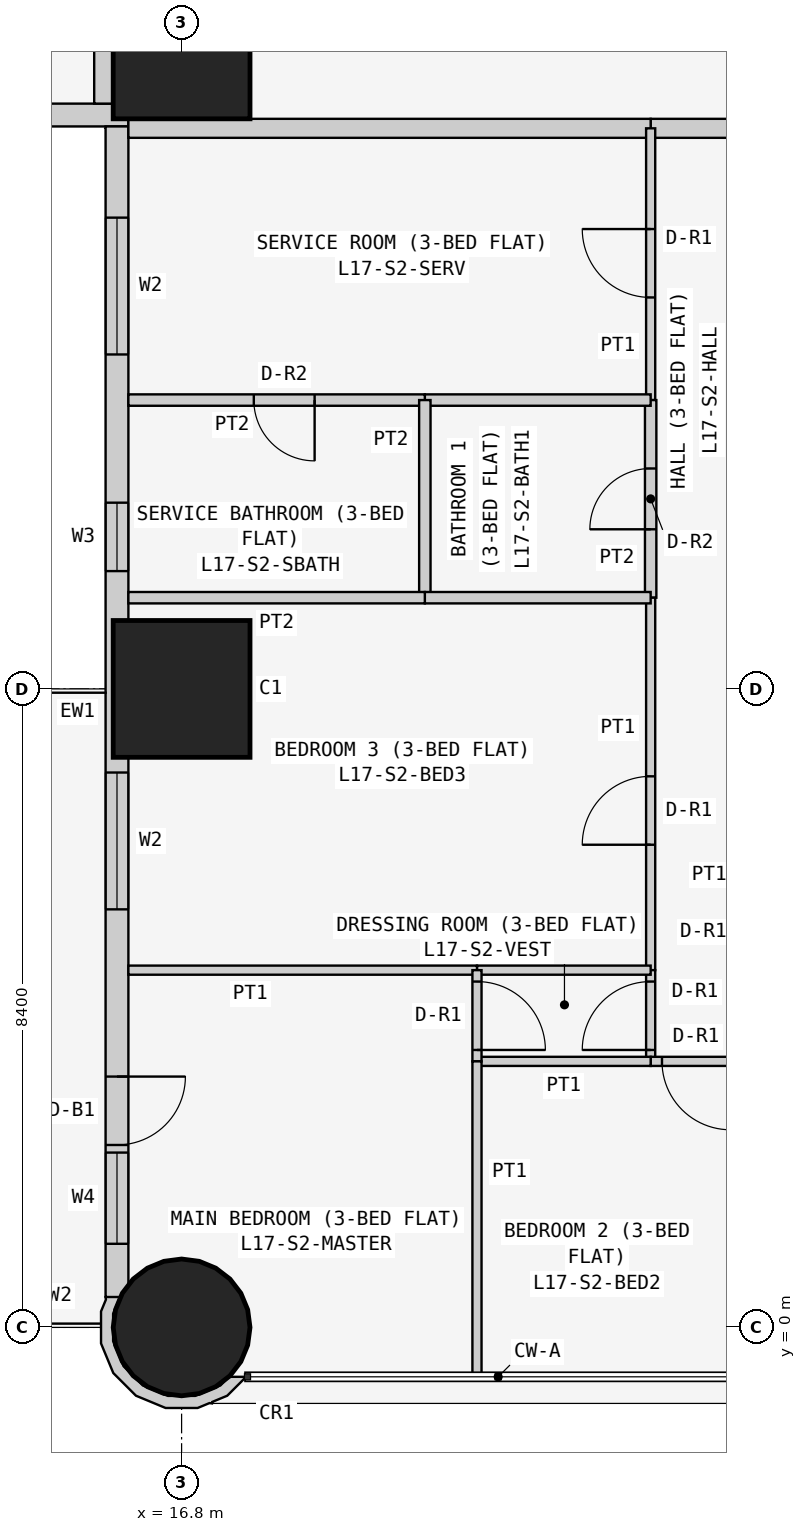
"""IFC4 building model, lengths in metres.
Left out: names, types, materials, properties, quantities, classifications, styles, units other than length and angle.
Written with IfcOpenShell. Run it as: python <this file> out.ifc"""

import sys

from ifc_helpers import new_model, si_unit, direction, frame, frame_2d, origin, origin_2d, place, context, subcontext, project, spatial, polyline, rectangle, circle, outline, extrude, element, fill, save


model = new_model("IFC4")
c1 = context("Model", 3, precision=1e-05, world=origin(), true_north=direction((0.0, 1.0)))
c2 = subcontext(c1, "Body", "Model", "MODEL_VIEW")
j1 = project(units=[si_unit("LENGTHUNIT", "METRE"), si_unit("PLANEANGLEUNIT", "RADIAN")], contexts=[c1])
p1 = place(None, origin())
s1 = spatial("IfcSite", under=j1, at=p1, CompositionType="ELEMENT")
p2 = place(p1, origin())
s2 = spatial("IfcBuilding", under=s1, at=p2, CompositionType="ELEMENT")
p3 = place(p2, frame((0.0, 0.0, 70.5)))
s3 = spatial("IfcBuildingStorey", under=s2, at=p3, CompositionType="ELEMENT", Elevation=70.5)
p4 = place(p3, frame((16.8, 0.0, 0.0), z_axis=(0.0, 0.0, 1.0), x_axis=(1.0, 0.0, 0.0)))
e1 = element("IfcColumn", 1, at=p4, inside=s3, PredefinedType="COLUMN", context=c2, shape_type="SweptSolid", body=[
    extrude(circle(Radius=0.9, at=origin_2d()), origin(), (0.0, 0.0, 1.0), 3.6),
])
for number, where, z_axis, x_axis in (
    (2, (16.8, 8.4, 0.0), (0.0, 0.0, 1.0), (1.0, 0.0, 0.0)),
    (3, (16.8, 16.8, 0.0), (0.0, 0.0, 1.0), (1.0, 0.0, 0.0)),
):
    element("IfcColumn", number, at=place(p3, frame(where, z_axis=z_axis, x_axis=x_axis)), inside=s3, PredefinedType="COLUMN", context=c2, shape_type="SweptSolid", body=[
        extrude(rectangle(XDim=1.8, YDim=1.8, at=origin_2d()), origin(), (0.0, 0.0, 1.0), 3.6),
    ])
p5 = place(p3, frame((0.4, 15.95, 0.0), z_axis=(0.0, 0.0, 1.0), x_axis=(1.0, 0.0, 0.0)))
e4 = element("IfcWall", 4, at=p5, inside=s3, PredefinedType="SOLIDWALL", context=c2, shape_type="SweptSolid", body=[
    extrude(rectangle(XDim=15.7, YDim=0.3, at=frame_2d((7.85, 0.0))), origin(), (0.0, 0.0, 1.0), 3.45),
])
p6 = place(p5, frame((12.4, 0.0, 0.9)))
e5 = element("IfcOpeningElement", 5, at=p6, cuts=e4, PredefinedType="OPENING", context=c2, shape_type="SweptSolid", body=[
    extrude(rectangle(XDim=1.8, YDim=1.5, at=frame_2d((0.9, 0.75))), frame((0.0, 0.16, 0.0), z_axis=(0.0, -1.0, 0.0), x_axis=(1.0, 0.0, 0.0)), (0.0, 0.0, 1.0), 0.32),
])
p7 = place(p5, frame((9.55, 0.0, 1.5)))
e6 = element("IfcOpeningElement", 6, at=p7, cuts=e4, PredefinedType="OPENING", context=c2, shape_type="SweptSolid", body=[
    extrude(rectangle(XDim=0.9, YDim=0.7, at=frame_2d((0.45, 0.35))), frame((0.0, 0.16, 0.0), z_axis=(0.0, -1.0, 0.0), x_axis=(1.0, 0.0, 0.0)), (0.0, 0.0, 1.0), 0.32),
])
p8 = place(p5, frame((5.1, 0.0, 0.9)))
e7 = element("IfcOpeningElement", 7, at=p8, cuts=e4, PredefinedType="OPENING", context=c2, shape_type="SweptSolid", body=[
    extrude(rectangle(XDim=1.8, YDim=1.5, at=frame_2d((0.9, 0.75))), frame((0.0, 0.16, 0.0), z_axis=(0.0, -1.0, 0.0), x_axis=(1.0, 0.0, 0.0)), (0.0, 0.0, 1.0), 0.32),
])
p9 = place(p5, frame((2.0, 0.0, 0.0)))
e8 = element("IfcOpeningElement", 8, at=p9, cuts=e4, PredefinedType="OPENING", context=c2, shape_type="SweptSolid", body=[
    extrude(rectangle(XDim=0.9, YDim=2.4, at=frame_2d((0.45, 1.2))), frame((0.0, 0.16, 0.0), z_axis=(0.0, -1.0, 0.0), x_axis=(1.0, 0.0, 0.0)), (0.0, 0.0, 1.0), 0.32),
])
p10 = place(p5, frame((0.7, 0.0, 0.9)))
e9 = element("IfcOpeningElement", 9, at=p10, cuts=e4, PredefinedType="OPENING", context=c2, shape_type="SweptSolid", body=[
    extrude(rectangle(XDim=1.2, YDim=1.5, at=frame_2d((0.6, 0.75))), frame((0.0, 0.16, 0.0), z_axis=(0.0, -1.0, 0.0), x_axis=(1.0, 0.0, 0.0)), (0.0, 0.0, 1.0), 0.32),
])
p11 = place(p3, frame((15.95, 15.8, 0.0), z_axis=(0.0, 0.0, 1.0), x_axis=(0.0, -1.0, 0.0)))
e10 = element("IfcWall", 10, at=p11, inside=s3, PredefinedType="SOLIDWALL", context=c2, shape_type="SweptSolid", body=[
    extrude(rectangle(XDim=15.4, YDim=0.3, at=frame_2d((7.7, 0.0))), origin(), (0.0, 0.0, 1.0), 3.45),
])
p12 = place(p11, frame((1.2, 0.0, 0.9)))
e11 = element("IfcOpeningElement", 11, at=p12, cuts=e10, PredefinedType="OPENING", context=c2, shape_type="SweptSolid", body=[
    extrude(rectangle(XDim=1.8, YDim=1.5, at=frame_2d((0.9, 0.75))), frame((0.0, 0.16, 0.0), z_axis=(0.0, -1.0, 0.0), x_axis=(1.0, 0.0, 0.0)), (0.0, 0.0, 1.0), 0.32),
])
p13 = place(p11, frame((4.95, 0.0, 1.5)))
e12 = element("IfcOpeningElement", 12, at=p13, cuts=e10, PredefinedType="OPENING", context=c2, shape_type="SweptSolid", body=[
    extrude(rectangle(XDim=0.9, YDim=0.7, at=frame_2d((0.45, 0.35))), frame((0.0, 0.16, 0.0), z_axis=(0.0, -1.0, 0.0), x_axis=(1.0, 0.0, 0.0)), (0.0, 0.0, 1.0), 0.32),
])
p14 = place(p11, frame((8.5, 0.0, 0.9)))
e13 = element("IfcOpeningElement", 13, at=p14, cuts=e10, PredefinedType="OPENING", context=c2, shape_type="SweptSolid", body=[
    extrude(rectangle(XDim=1.8, YDim=1.5, at=frame_2d((0.9, 0.75))), frame((0.0, 0.16, 0.0), z_axis=(0.0, -1.0, 0.0), x_axis=(1.0, 0.0, 0.0)), (0.0, 0.0, 1.0), 0.32),
])
p15 = place(p11, frame((12.5, 0.0, 0.0)))
e14 = element("IfcOpeningElement", 14, at=p15, cuts=e10, PredefinedType="OPENING", context=c2, shape_type="SweptSolid", body=[
    extrude(rectangle(XDim=0.9, YDim=2.4, at=frame_2d((0.45, 1.2))), frame((0.0, 0.16, 0.0), z_axis=(0.0, -1.0, 0.0), x_axis=(1.0, 0.0, 0.0)), (0.0, 0.0, 1.0), 0.32),
])
p16 = place(p11, frame((13.5, 0.0, 0.9)))
e15 = element("IfcOpeningElement", 15, at=p16, cuts=e10, PredefinedType="OPENING", context=c2, shape_type="SweptSolid", body=[
    extrude(rectangle(XDim=1.2, YDim=1.5, at=frame_2d((0.6, 0.75))), frame((0.0, 0.16, 0.0), z_axis=(0.0, -1.0, 0.0), x_axis=(1.0, 0.0, 0.0)), (0.0, 0.0, 1.0), 0.32),
])
p17 = place(p3, frame((15.89, 0.364, 0.0), z_axis=(0.0, 0.0, 1.0), x_axis=(-0.377204953059, -0.926129809145, 0.0)))
e16 = element("IfcWall", 16, at=p17, inside=s3, PredefinedType="SOLIDWALL", context=c2, shape_type="SweptSolid", body=[
    extrude(outline(polyline([(0.36, 1.803), (0.509, 1.741), (0.761, 1.486), (0.896, 1.154), (0.894, 0.795), (0.755, 0.465), (0.5, 0.213), (0.168, 0.078), (-0.1, 0.08), (0.001, -0.097), (0.03, -0.08), (0.199, -0.081), (0.589, 0.078), (0.889, 0.374), (1.053, 0.763), (1.055, 1.185), (0.896, 1.575), (0.778, 1.695), (0.769, 1.728), (0.75, 1.723), (0.6, 1.875), (0.295, 2.004), (0.281, 1.998), (0.36, 1.803)])), origin(), (0.0, 0.0, 1.0), 3.45),
])
p18 = place(p3, frame((24.171, 15.775, 0.0), z_axis=(0.0, 0.0, 1.0), x_axis=(-1.0, 0.0, 0.0)))
e17 = element("IfcWall", 17, at=p18, inside=s3, PredefinedType="PARTITIONING", context=c2, shape_type="SweptSolid", body=[
    extrude(rectangle(XDim=1.2, YDim=0.25, at=frame_2d((0.6, 0.0))), origin(), (0.0, 0.0, 1.0), 3.45),
])
p19 = place(p3, frame((22.971, 15.775, 0.0), z_axis=(0.0, 0.0, 1.0), x_axis=(-1.0, 0.0, 0.0)))
e18 = element("IfcWall", 18, at=p19, inside=s3, PredefinedType="PARTITIONING", context=c2, shape_type="SweptSolid", body=[
    extrude(rectangle(XDim=6.871, YDim=0.25, at=frame_2d((3.436, 0.0))), origin(), (0.0, 0.0, 1.0), 3.45),
])
p20 = place(p3, frame((15.775, 16.1, 0.0), z_axis=(0.0, 0.0, 1.0), x_axis=(0.0, 1.0, 0.0)))
e19 = element("IfcWall", 19, at=p20, inside=s3, PredefinedType="PARTITIONING", context=c2, shape_type="SweptSolid", body=[
    extrude(rectangle(XDim=6.471, YDim=0.25, at=frame_2d((3.235, 0.0))), origin(), (0.0, 0.0, 1.0), 3.45),
])
p21 = place(p3, frame((22.971, 12.2, 0.0), z_axis=(0.0, 0.0, 1.0), x_axis=(0.0, 1.0, 0.0)))
e20 = element("IfcWall", 20, at=p21, inside=s3, PredefinedType="PARTITIONING", context=c2, shape_type="SweptSolid", body=[
    extrude(rectangle(XDim=3.575, YDim=0.12, at=frame_2d((1.788, 0.0))), origin(), (0.0, 0.0, 1.0), 3.45),
])
p22 = place(p21, frame((1.35, 0.0, 0.0)))
e21 = element("IfcOpeningElement", 21, at=p22, cuts=e20, PredefinedType="OPENING", context=c2, shape_type="SweptSolid", body=[
    extrude(rectangle(XDim=0.9, YDim=2.1, at=frame_2d((0.45, 1.05))), frame((0.0, 0.07, 0.0), z_axis=(0.0, -1.0, 0.0), x_axis=(1.0, 0.0, 0.0)), (0.0, 0.0, 1.0), 0.14),
])
p23 = place(p3, frame((22.971, 9.6, 0.0), z_axis=(0.0, 0.0, 1.0), x_axis=(0.0, 1.0, 0.0)))
e22 = element("IfcWall", 22, at=p23, inside=s3, PredefinedType="PARTITIONING", context=c2, shape_type="SweptSolid", body=[
    extrude(rectangle(XDim=2.6, YDim=0.15, at=frame_2d((1.3, 0.0))), origin(), (0.0, 0.0, 1.0), 3.45),
])
p24 = place(p23, frame((0.9, 0.0, 0.0)))
e23 = element("IfcOpeningElement", 23, at=p24, cuts=e22, PredefinedType="OPENING", context=c2, shape_type="SweptSolid", body=[
    extrude(rectangle(XDim=0.8, YDim=2.1, at=frame_2d((0.4, 1.05))), frame((0.0, 0.085, 0.0), z_axis=(0.0, -1.0, 0.0), x_axis=(1.0, 0.0, 0.0)), (0.0, 0.0, 1.0), 0.17),
])
p25 = place(p3, frame((22.971, 4.7, 0.0), z_axis=(0.0, 0.0, 1.0), x_axis=(0.0, 1.0, 0.0)))
e24 = element("IfcWall", 24, at=p25, inside=s3, PredefinedType="PARTITIONING", context=c2, shape_type="SweptSolid", body=[
    extrude(rectangle(XDim=4.9, YDim=0.12, at=frame_2d((2.45, 0.0))), origin(), (0.0, 0.0, 1.0), 3.45),
])
p26 = place(p25, frame((1.65, 0.0, 0.0)))
e25 = element("IfcOpeningElement", 25, at=p26, cuts=e24, PredefinedType="OPENING", context=c2, shape_type="SweptSolid", body=[
    extrude(rectangle(XDim=0.9, YDim=2.1, at=frame_2d((0.45, 1.05))), frame((0.0, 0.07, 0.0), z_axis=(0.0, -1.0, 0.0), x_axis=(1.0, 0.0, 0.0)), (0.0, 0.0, 1.0), 0.14),
])
p27 = place(p3, frame((22.971, 3.5, 0.0), z_axis=(0.0, 0.0, 1.0), x_axis=(0.0, 1.0, 0.0)))
e26 = element("IfcWall", 26, at=p27, inside=s3, PredefinedType="PARTITIONING", context=c2, shape_type="SweptSolid", body=[
    extrude(rectangle(XDim=1.2, YDim=0.12, at=frame_2d((0.6, 0.0))), origin(), (0.0, 0.0, 1.0), 3.45),
])
p28 = place(p27, frame((0.15, 0.0, 0.0)))
e27 = element("IfcOpeningElement", 27, at=p28, cuts=e26, PredefinedType="OPENING", context=c2, shape_type="SweptSolid", body=[
    extrude(rectangle(XDim=0.9, YDim=2.1, at=frame_2d((0.45, 1.05))), frame((0.0, 0.07, 0.0), z_axis=(0.0, -1.0, 0.0), x_axis=(1.0, 0.0, 0.0)), (0.0, 0.0, 1.0), 0.14),
])
p29 = place(p3, frame((24.171, 3.5, 0.0), z_axis=(0.0, 0.0, 1.0), x_axis=(-1.0, 0.0, 0.0)))
e28 = element("IfcWall", 28, at=p29, inside=s3, PredefinedType="PARTITIONING", context=c2, shape_type="SweptSolid", body=[
    extrude(rectangle(XDim=1.2, YDim=0.12, at=frame_2d((0.6, 0.0))), origin(), (0.0, 0.0, 1.0), 3.45),
])
p30 = place(p29, frame((0.151, 0.0, 0.0)))
e29 = element("IfcOpeningElement", 29, at=p30, cuts=e28, PredefinedType="OPENING", context=c2, shape_type="SweptSolid", body=[
    extrude(rectangle(XDim=0.9, YDim=2.1, at=frame_2d((0.45, 1.05))), frame((0.0, 0.07, 0.0), z_axis=(0.0, -1.0, 0.0), x_axis=(1.0, 0.0, 0.0)), (0.0, 0.0, 1.0), 0.14),
])
p31 = place(p3, frame((22.971, 12.2, 0.0), z_axis=(0.0, 0.0, 1.0), x_axis=(-1.0, 0.0, 0.0)))
e30 = element("IfcWall", 30, at=p31, inside=s3, PredefinedType="PARTITIONING", context=c2, shape_type="SweptSolid", body=[
    extrude(rectangle(XDim=2.971, YDim=0.15, at=frame_2d((1.485, 0.0))), origin(), (0.0, 0.0, 1.0), 3.45),
])
p32 = place(p3, frame((20.0, 12.2, 0.0), z_axis=(0.0, 0.0, 1.0), x_axis=(-1.0, 0.0, 0.0)))
e31 = element("IfcWall", 31, at=p32, inside=s3, PredefinedType="PARTITIONING", context=c2, shape_type="SweptSolid", body=[
    extrude(rectangle(XDim=3.9, YDim=0.15, at=frame_2d((1.95, 0.0))), origin(), (0.0, 0.0, 1.0), 3.45),
])
p33 = place(p32, frame((1.45, 0.0, 0.0)))
e32 = element("IfcOpeningElement", 32, at=p33, cuts=e31, PredefinedType="OPENING", context=c2, shape_type="SweptSolid", body=[
    extrude(rectangle(XDim=0.8, YDim=2.1, at=frame_2d((0.4, 1.05))), frame((0.0, 0.085, 0.0), z_axis=(0.0, -1.0, 0.0), x_axis=(1.0, 0.0, 0.0)), (0.0, 0.0, 1.0), 0.17),
])
p34 = place(p3, frame((20.0, 9.6, 0.0), z_axis=(0.0, 0.0, 1.0), x_axis=(0.0, 1.0, 0.0)))
e33 = element("IfcWall", 33, at=p34, inside=s3, PredefinedType="PARTITIONING", context=c2, shape_type="SweptSolid", body=[
    extrude(rectangle(XDim=2.6, YDim=0.15, at=frame_2d((1.3, 0.0))), origin(), (0.0, 0.0, 1.0), 3.45),
])
p35 = place(p3, frame((22.971, 9.6, 0.0), z_axis=(0.0, 0.0, 1.0), x_axis=(-1.0, 0.0, 0.0)))
e34 = element("IfcWall", 34, at=p35, inside=s3, PredefinedType="PARTITIONING", context=c2, shape_type="SweptSolid", body=[
    extrude(rectangle(XDim=2.971, YDim=0.15, at=frame_2d((1.485, 0.0))), origin(), (0.0, 0.0, 1.0), 3.45),
])
p36 = place(p3, frame((20.0, 9.6, 0.0), z_axis=(0.0, 0.0, 1.0), x_axis=(-1.0, 0.0, 0.0)))
e35 = element("IfcWall", 35, at=p36, inside=s3, PredefinedType="PARTITIONING", context=c2, shape_type="SweptSolid", body=[
    extrude(rectangle(XDim=3.9, YDim=0.15, at=frame_2d((1.95, 0.0))), origin(), (0.0, 0.0, 1.0), 3.45),
])
p37 = place(p3, frame((22.971, 4.7, 0.0), z_axis=(0.0, 0.0, 1.0), x_axis=(-1.0, 0.0, 0.0)))
e36 = element("IfcWall", 36, at=p37, inside=s3, PredefinedType="PARTITIONING", context=c2, shape_type="SweptSolid", body=[
    extrude(rectangle(XDim=2.285, YDim=0.12, at=frame_2d((1.143, 0.0))), origin(), (0.0, 0.0, 1.0), 3.45),
])
p38 = place(p3, frame((20.686, 4.7, 0.0), z_axis=(0.0, 0.0, 1.0), x_axis=(-1.0, 0.0, 0.0)))
e37 = element("IfcWall", 37, at=p38, inside=s3, PredefinedType="PARTITIONING", context=c2, shape_type="SweptSolid", body=[
    extrude(rectangle(XDim=4.586, YDim=0.12, at=frame_2d((2.293, 0.0))), origin(), (0.0, 0.0, 1.0), 3.45),
])
p39 = place(p3, frame((22.971, 3.5, 0.0), z_axis=(0.0, 0.0, 1.0), x_axis=(-1.0, 0.0, 0.0)))
e38 = element("IfcWall", 38, at=p39, inside=s3, PredefinedType="PARTITIONING", context=c2, shape_type="SweptSolid", body=[
    extrude(rectangle(XDim=2.285, YDim=0.12, at=frame_2d((1.143, 0.0))), origin(), (0.0, 0.0, 1.0), 3.45),
])
p40 = place(p3, frame((20.686, 3.5, 0.0), z_axis=(0.0, 0.0, 1.0), x_axis=(0.0, 1.0, 0.0)))
e39 = element("IfcWall", 39, at=p40, inside=s3, PredefinedType="PARTITIONING", context=c2, shape_type="SweptSolid", body=[
    extrude(rectangle(XDim=1.2, YDim=0.12, at=frame_2d((0.6, 0.0))), origin(), (0.0, 0.0, 1.0), 3.45),
])
p41 = place(p40, frame((0.15, 0.0, 0.0)))
e40 = element("IfcOpeningElement", 40, at=p41, cuts=e39, PredefinedType="OPENING", context=c2, shape_type="SweptSolid", body=[
    extrude(rectangle(XDim=0.9, YDim=2.1, at=frame_2d((0.45, 1.05))), frame((0.0, 0.07, 0.0), z_axis=(0.0, -1.0, 0.0), x_axis=(1.0, 0.0, 0.0)), (0.0, 0.0, 1.0), 0.14),
])
p42 = place(p3, frame((20.686, -0.65, 0.0), z_axis=(0.0, 0.0, 1.0), x_axis=(0.0, 1.0, 0.0)))
e41 = element("IfcWall", 41, at=p42, inside=s3, PredefinedType="PARTITIONING", context=c2, shape_type="SweptSolid", body=[
    extrude(rectangle(XDim=4.15, YDim=0.12, at=frame_2d((2.075, 0.0))), origin(), (0.0, 0.0, 1.0), 3.45),
])
p43 = place(p12, origin())
e42 = element("IfcWindow", 42, at=p43, inside=s3, PartitioningType="SINGLE_PANEL", PredefinedType="WINDOW", context=c2, shape_type="SweptSolid", body=[
    extrude(rectangle(XDim=1.8, YDim=1.5, at=frame_2d((0.9, 0.75))), frame((0.0, 0.03, 0.0), z_axis=(0.0, -1.0, 0.0), x_axis=(1.0, 0.0, 0.0)), (0.0, 0.0, 1.0), 0.06),
])
fill(e11, e42)
p44 = place(p13, origin())
e43 = element("IfcWindow", 43, at=p44, inside=s3, PartitioningType="SINGLE_PANEL", PredefinedType="WINDOW", context=c2, shape_type="SweptSolid", body=[
    extrude(rectangle(XDim=0.9, YDim=0.7, at=frame_2d((0.45, 0.35))), frame((0.0, 0.03, 0.0), z_axis=(0.0, -1.0, 0.0), x_axis=(1.0, 0.0, 0.0)), (0.0, 0.0, 1.0), 0.06),
])
fill(e12, e43)
p45 = place(p14, origin())
e44 = element("IfcWindow", 44, at=p45, inside=s3, PartitioningType="SINGLE_PANEL", PredefinedType="WINDOW", context=c2, shape_type="SweptSolid", body=[
    extrude(rectangle(XDim=1.8, YDim=1.5, at=frame_2d((0.9, 0.75))), frame((0.0, 0.03, 0.0), z_axis=(0.0, -1.0, 0.0), x_axis=(1.0, 0.0, 0.0)), (0.0, 0.0, 1.0), 0.06),
])
fill(e13, e44)
p46 = place(p15, origin())
e45 = element("IfcDoor", 45, at=p46, inside=s3, OperationType="SINGLE_SWING_LEFT", PredefinedType="DOOR", context=c2, shape_type="SweptSolid", body=[
    extrude(rectangle(XDim=0.9, YDim=2.4, at=frame_2d((0.45, 1.2))), frame((0.0, 0.025, 0.0), z_axis=(0.0, -1.0, 0.0), x_axis=(1.0, 0.0, 0.0)), (0.0, 0.0, 1.0), 0.05),
])
fill(e14, e45)
p47 = place(p16, origin())
e46 = element("IfcWindow", 46, at=p47, inside=s3, PartitioningType="SINGLE_PANEL", PredefinedType="WINDOW", context=c2, shape_type="SweptSolid", body=[
    extrude(rectangle(XDim=1.2, YDim=1.5, at=frame_2d((0.6, 0.75))), frame((0.0, 0.03, 0.0), z_axis=(0.0, -1.0, 0.0), x_axis=(1.0, 0.0, 0.0)), (0.0, 0.0, 1.0), 0.06),
])
fill(e15, e46)
p48 = place(p22, origin())
e47 = element("IfcDoor", 47, at=p48, inside=s3, OperationType="SINGLE_SWING_RIGHT", PredefinedType="DOOR", context=c2, shape_type="SweptSolid", body=[
    extrude(rectangle(XDim=0.9, YDim=2.1, at=frame_2d((0.45, 1.05))), frame((0.0, 0.025, 0.0), z_axis=(0.0, -1.0, 0.0), x_axis=(1.0, 0.0, 0.0)), (0.0, 0.0, 1.0), 0.05),
])
fill(e21, e47)
p49 = place(p33, origin())
e48 = element("IfcDoor", 48, at=p49, inside=s3, OperationType="SINGLE_SWING_LEFT", PredefinedType="DOOR", context=c2, shape_type="SweptSolid", body=[
    extrude(rectangle(XDim=0.8, YDim=2.1, at=frame_2d((0.4, 1.05))), frame((0.0, 0.025, 0.0), z_axis=(0.0, -1.0, 0.0), x_axis=(1.0, 0.0, 0.0)), (0.0, 0.0, 1.0), 0.05),
])
fill(e32, e48)
p50 = place(p24, origin())
e49 = element("IfcDoor", 49, at=p50, inside=s3, OperationType="SINGLE_SWING_LEFT", PredefinedType="DOOR", context=c2, shape_type="SweptSolid", body=[
    extrude(rectangle(XDim=0.8, YDim=2.1, at=frame_2d((0.4, 1.05))), frame((0.0, 0.025, 0.0), z_axis=(0.0, -1.0, 0.0), x_axis=(1.0, 0.0, 0.0)), (0.0, 0.0, 1.0), 0.05),
])
fill(e23, e49)
p51 = place(p26, origin())
e50 = element("IfcDoor", 50, at=p51, inside=s3, OperationType="SINGLE_SWING_LEFT", PredefinedType="DOOR", context=c2, shape_type="SweptSolid", body=[
    extrude(rectangle(XDim=0.9, YDim=2.1, at=frame_2d((0.45, 1.05))), frame((0.0, 0.025, 0.0), z_axis=(0.0, -1.0, 0.0), x_axis=(1.0, 0.0, 0.0)), (0.0, 0.0, 1.0), 0.05),
])
fill(e25, e50)
p52 = place(p28, origin())
e51 = element("IfcDoor", 51, at=p52, inside=s3, OperationType="SINGLE_SWING_LEFT", PredefinedType="DOOR", context=c2, shape_type="SweptSolid", body=[
    extrude(rectangle(XDim=0.9, YDim=2.1, at=frame_2d((0.45, 1.05))), frame((0.0, 0.025, 0.0), z_axis=(0.0, -1.0, 0.0), x_axis=(1.0, 0.0, 0.0)), (0.0, 0.0, 1.0), 0.05),
])
fill(e27, e51)
p53 = place(p41, frame((0.9, 0.0, 0.0), z_axis=(0.0, 0.0, 1.0), x_axis=(-1.0, 0.0, 0.0)))
e52 = element("IfcDoor", 52, at=p53, inside=s3, OperationType="SINGLE_SWING_RIGHT", PredefinedType="DOOR", context=c2, shape_type="SweptSolid", body=[
    extrude(rectangle(XDim=0.9, YDim=2.1, at=frame_2d((0.45, 1.05))), frame((0.0, 0.025, 0.0), z_axis=(0.0, -1.0, 0.0), x_axis=(1.0, 0.0, 0.0)), (0.0, 0.0, 1.0), 0.05),
])
fill(e40, e52)
p54 = place(p30, origin())
e53 = element("IfcDoor", 53, at=p54, inside=s3, OperationType="SINGLE_SWING_LEFT", PredefinedType="DOOR", context=c2, shape_type="SweptSolid", body=[
    extrude(rectangle(XDim=0.9, YDim=2.1, at=frame_2d((0.45, 1.05))), frame((0.0, 0.025, 0.0), z_axis=(0.0, -1.0, 0.0), x_axis=(1.0, 0.0, 0.0)), (0.0, 0.0, 1.0), 0.05),
])
fill(e29, e53)
save(model, sys.argv[1])
